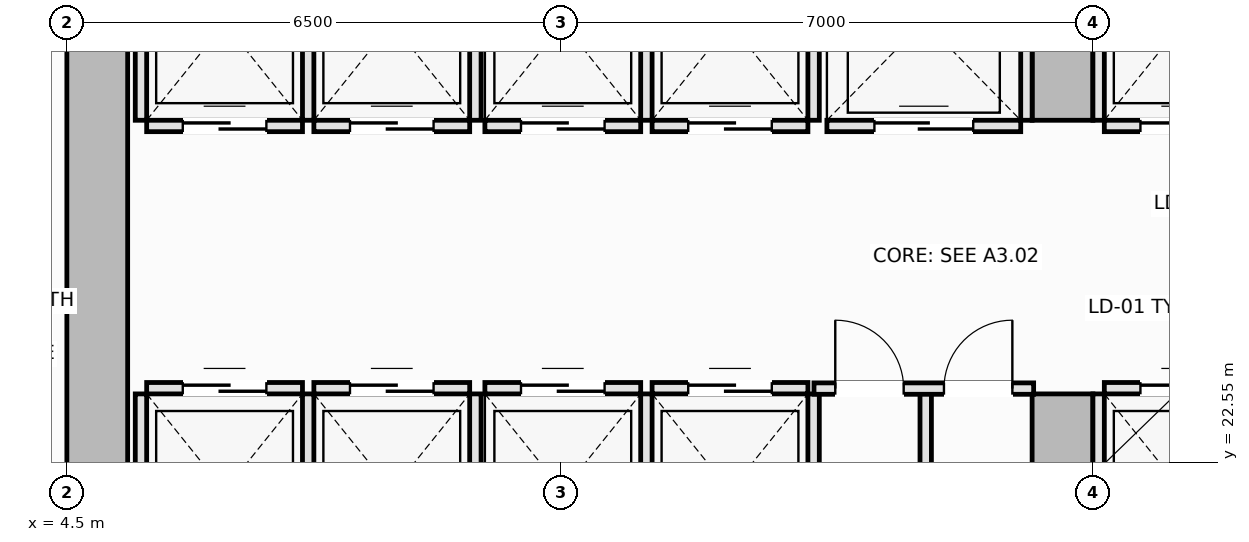
"""IFC4 building model, lengths in metres.
Left out: names, types, materials, properties, quantities, classifications, styles, units other than length and angle.
Written with IfcOpenShell. Run it as: python <this file> out.ifc"""

import sys

from ifc_helpers import new_model, si_unit, direction, frame, frame_2d, origin, place, context, subcontext, project, spatial, rectangle, extrude, element, fill, save


model = new_model("IFC4")
c1 = context("Model", 3, precision=1e-05, world=origin(), true_north=direction((0.0, 1.0)))
c2 = subcontext(c1, "Body", "Model", "MODEL_VIEW")
j1 = project(units=[si_unit("LENGTHUNIT", "METRE"), si_unit("PLANEANGLEUNIT", "RADIAN")], contexts=[c1])
p1 = place(None, origin())
s1 = spatial("IfcSite", under=j1, at=p1, CompositionType="ELEMENT")
p2 = place(p1, origin())
s2 = spatial("IfcBuilding", under=s1, at=p2, CompositionType="ELEMENT")
p3 = place(p2, origin())
s3 = spatial("IfcBuildingStorey", under=s2, at=p3, CompositionType="ELEMENT", Elevation=0.0)
p4 = place(p3, frame((4.9, 14.8, 0.0), z_axis=(0.0, 0.0, 1.0), x_axis=(0.0, 1.0, 0.0)))
e1 = element("IfcWall", 1, at=p4, inside=s3, PredefinedType="SHEAR", context=c2, shape_type="SweptSolid", body=[
    extrude(rectangle(XDim=20.9, YDim=0.8, at=frame_2d((10.45, 0.0))), origin(), (0.0, 0.0, 1.0), 6.0),
])
p5 = place(p3, frame((17.6, 14.8, 0.0), z_axis=(0.0, 0.0, 1.0), x_axis=(0.0, 1.0, 0.0)))
e2 = element("IfcWall", 2, at=p5, inside=s3, PredefinedType="SHEAR", context=c2, shape_type="SweptSolid", body=[
    extrude(rectangle(XDim=8.65, YDim=0.8, at=frame_2d((4.325, 0.0))), origin(), (0.0, 0.0, 1.0), 6.0),
])
p6 = place(p5, frame((4.1, 0.0, 0.0)))
e3 = element("IfcOpeningElement", 3, at=p6, cuts=e2, PredefinedType="OPENING", context=c2, shape_type="SweptSolid", body=[
    extrude(rectangle(XDim=1.1, YDim=2.15, at=frame_2d((0.55, 1.075))), frame((0.0, 0.41, 0.0), z_axis=(0.0, -1.0, 0.0), x_axis=(1.0, 0.0, 0.0)), (0.0, 0.0, 1.0), 0.82),
])
p7 = place(p3, frame((17.6, 27.05, 0.0), z_axis=(0.0, 0.0, 1.0), x_axis=(0.0, 1.0, 0.0)))
e4 = element("IfcWall", 4, at=p7, inside=s3, PredefinedType="SHEAR", context=c2, shape_type="SweptSolid", body=[
    extrude(rectangle(XDim=8.65, YDim=0.8, at=frame_2d((4.325, 0.0))), origin(), (0.0, 0.0, 1.0), 6.0),
])
p8 = place(p7, frame((3.45, 0.0, 0.0)))
e5 = element("IfcOpeningElement", 5, at=p8, cuts=e4, PredefinedType="OPENING", context=c2, shape_type="SweptSolid", body=[
    extrude(rectangle(XDim=1.1, YDim=2.15, at=frame_2d((0.55, 1.075))), frame((0.0, 0.41, 0.0), z_axis=(0.0, -1.0, 0.0), x_axis=(1.0, 0.0, 0.0)), (0.0, 0.0, 1.0), 0.82),
])
p9 = place(p3, frame((18.15, 23.525, 0.0), z_axis=(0.0, 0.0, 1.0), x_axis=(1.0, 0.0, 0.0)))
e6 = element("IfcWall", 6, at=p9, inside=s3, PredefinedType="PARTITIONING", context=c2, shape_type="SweptSolid", body=[
    extrude(rectangle(XDim=2.05, YDim=0.15, at=frame_2d((1.025, 0.0))), origin(), (0.0, 0.0, 1.0), 5.8),
])
p10 = place(p9, frame((0.475, 0.0, 0.0)))
e7 = element("IfcOpeningElement", 7, at=p10, cuts=e6, PredefinedType="OPENING", context=c2, shape_type="SweptSolid", body=[
    extrude(rectangle(XDim=1.1, YDim=2.2, at=frame_2d((0.55, 1.1))), frame((0.0, 0.085, 0.0), z_axis=(0.0, -1.0, 0.0), x_axis=(1.0, 0.0, 0.0)), (0.0, 0.0, 1.0), 0.17),
])
p11 = place(p3, frame((18.075, 20.9, 0.0), z_axis=(0.0, 0.0, 1.0), x_axis=(0.0, 1.0, 0.0)))
e8 = element("IfcWall", 8, at=p11, inside=s3, PredefinedType="PARTITIONING", context=c2, shape_type="SweptSolid", body=[
    extrude(rectangle(XDim=2.55, YDim=0.15, at=frame_2d((1.275, 0.0))), origin(), (0.0, 0.0, 1.0), 5.8),
])
p12 = place(p3, frame((18.15, 26.975, 0.0), z_axis=(0.0, 0.0, 1.0), x_axis=(1.0, 0.0, 0.0)))
e9 = element("IfcWall", 9, at=p12, inside=s3, PredefinedType="PARTITIONING", context=c2, shape_type="SweptSolid", body=[
    extrude(rectangle(XDim=2.05, YDim=0.15, at=frame_2d((1.025, 0.0))), origin(), (0.0, 0.0, 1.0), 5.8),
])
p13 = place(p12, frame((0.475, 0.0, 0.0)))
e10 = element("IfcOpeningElement", 10, at=p13, cuts=e9, PredefinedType="OPENING", context=c2, shape_type="SweptSolid", body=[
    extrude(rectangle(XDim=1.1, YDim=2.2, at=frame_2d((0.55, 1.1))), frame((0.0, 0.085, 0.0), z_axis=(0.0, -1.0, 0.0), x_axis=(1.0, 0.0, 0.0)), (0.0, 0.0, 1.0), 0.17),
])
p14 = place(p3, frame((18.075, 27.05, 0.0), z_axis=(0.0, 0.0, 1.0), x_axis=(0.0, 1.0, 0.0)))
e11 = element("IfcWall", 11, at=p14, inside=s3, PredefinedType="PARTITIONING", context=c2, shape_type="SweptSolid", body=[
    extrude(rectangle(XDim=2.55, YDim=0.15, at=frame_2d((1.275, 0.0))), origin(), (0.0, 0.0, 1.0), 5.8),
])
p15 = place(p3, frame((5.55, 23.525, 0.0), z_axis=(0.0, 0.0, 1.0), x_axis=(1.0, 0.0, 0.0)))
e12 = element("IfcWall", 12, at=p15, inside=s3, PredefinedType="PARTITIONING", context=c2, shape_type="SweptSolid", body=[
    extrude(rectangle(XDim=2.05, YDim=0.15, at=frame_2d((1.025, 0.0))), origin(), (0.0, 0.0, 1.0), 5.8),
])
p16 = place(p15, frame((0.475, 0.0, 0.0)))
e13 = element("IfcOpeningElement", 13, at=p16, cuts=e12, PredefinedType="OPENING", context=c2, shape_type="SweptSolid", body=[
    extrude(rectangle(XDim=1.1, YDim=2.2, at=frame_2d((0.55, 1.1))), frame((0.0, 0.085, 0.0), z_axis=(0.0, -1.0, 0.0), x_axis=(1.0, 0.0, 0.0)), (0.0, 0.0, 1.0), 0.17),
])
for number, where, z_axis, x_axis in (
    (14, (5.475, 20.9, 0.0), (0.0, 0.0, 1.0), (0.0, 1.0, 0.0)),
    (15, (7.675, 20.9, 0.0), (0.0, 0.0, 1.0), (0.0, 1.0, 0.0)),
):
    element("IfcWall", number, at=place(p3, frame(where, z_axis=z_axis, x_axis=x_axis)), inside=s3, PredefinedType="PARTITIONING", context=c2, shape_type="SweptSolid", body=[
        extrude(rectangle(XDim=2.55, YDim=0.15, at=frame_2d((1.275, 0.0))), origin(), (0.0, 0.0, 1.0), 5.8),
    ])
p17 = place(p3, frame((7.75, 23.525, 0.0), z_axis=(0.0, 0.0, 1.0), x_axis=(1.0, 0.0, 0.0)))
e16 = element("IfcWall", 16, at=p17, inside=s3, PredefinedType="PARTITIONING", context=c2, shape_type="SweptSolid", body=[
    extrude(rectangle(XDim=2.05, YDim=0.15, at=frame_2d((1.025, 0.0))), origin(), (0.0, 0.0, 1.0), 5.8),
])
p18 = place(p17, frame((0.475, 0.0, 0.0)))
e17 = element("IfcOpeningElement", 17, at=p18, cuts=e16, PredefinedType="OPENING", context=c2, shape_type="SweptSolid", body=[
    extrude(rectangle(XDim=1.1, YDim=2.2, at=frame_2d((0.55, 1.1))), frame((0.0, 0.085, 0.0), z_axis=(0.0, -1.0, 0.0), x_axis=(1.0, 0.0, 0.0)), (0.0, 0.0, 1.0), 0.17),
])
p19 = place(p3, frame((9.875, 20.9, 0.0), z_axis=(0.0, 0.0, 1.0), x_axis=(0.0, 1.0, 0.0)))
e18 = element("IfcWall", 18, at=p19, inside=s3, PredefinedType="PARTITIONING", context=c2, shape_type="SweptSolid", body=[
    extrude(rectangle(XDim=2.55, YDim=0.15, at=frame_2d((1.275, 0.0))), origin(), (0.0, 0.0, 1.0), 5.8),
])
p20 = place(p3, frame((5.55, 26.975, 0.0), z_axis=(0.0, 0.0, 1.0), x_axis=(1.0, 0.0, 0.0)))
e19 = element("IfcWall", 19, at=p20, inside=s3, PredefinedType="PARTITIONING", context=c2, shape_type="SweptSolid", body=[
    extrude(rectangle(XDim=2.05, YDim=0.15, at=frame_2d((1.025, 0.0))), origin(), (0.0, 0.0, 1.0), 5.8),
])
p21 = place(p20, frame((0.475, 0.0, 0.0)))
e20 = element("IfcOpeningElement", 20, at=p21, cuts=e19, PredefinedType="OPENING", context=c2, shape_type="SweptSolid", body=[
    extrude(rectangle(XDim=1.1, YDim=2.2, at=frame_2d((0.55, 1.1))), frame((0.0, 0.085, 0.0), z_axis=(0.0, -1.0, 0.0), x_axis=(1.0, 0.0, 0.0)), (0.0, 0.0, 1.0), 0.17),
])
for number, where, z_axis, x_axis in (
    (21, (5.475, 27.05, 0.0), (0.0, 0.0, 1.0), (0.0, 1.0, 0.0)),
    (22, (7.675, 27.05, 0.0), (0.0, 0.0, 1.0), (0.0, 1.0, 0.0)),
):
    element("IfcWall", number, at=place(p3, frame(where, z_axis=z_axis, x_axis=x_axis)), inside=s3, PredefinedType="PARTITIONING", context=c2, shape_type="SweptSolid", body=[
        extrude(rectangle(XDim=2.55, YDim=0.15, at=frame_2d((1.275, 0.0))), origin(), (0.0, 0.0, 1.0), 5.8),
    ])
p22 = place(p3, frame((7.75, 26.975, 0.0), z_axis=(0.0, 0.0, 1.0), x_axis=(1.0, 0.0, 0.0)))
e23 = element("IfcWall", 23, at=p22, inside=s3, PredefinedType="PARTITIONING", context=c2, shape_type="SweptSolid", body=[
    extrude(rectangle(XDim=2.05, YDim=0.15, at=frame_2d((1.025, 0.0))), origin(), (0.0, 0.0, 1.0), 5.8),
])
p23 = place(p22, frame((0.475, 0.0, 0.0)))
e24 = element("IfcOpeningElement", 24, at=p23, cuts=e23, PredefinedType="OPENING", context=c2, shape_type="SweptSolid", body=[
    extrude(rectangle(XDim=1.1, YDim=2.2, at=frame_2d((0.55, 1.1))), frame((0.0, 0.085, 0.0), z_axis=(0.0, -1.0, 0.0), x_axis=(1.0, 0.0, 0.0)), (0.0, 0.0, 1.0), 0.17),
])
p24 = place(p3, frame((9.875, 27.05, 0.0), z_axis=(0.0, 0.0, 1.0), x_axis=(0.0, 1.0, 0.0)))
e25 = element("IfcWall", 25, at=p24, inside=s3, PredefinedType="PARTITIONING", context=c2, shape_type="SweptSolid", body=[
    extrude(rectangle(XDim=2.55, YDim=0.15, at=frame_2d((1.275, 0.0))), origin(), (0.0, 0.0, 1.0), 5.8),
])
p25 = place(p3, frame((10.0, 23.525, 0.0), z_axis=(0.0, 0.0, 1.0), x_axis=(1.0, 0.0, 0.0)))
e26 = element("IfcWall", 26, at=p25, inside=s3, PredefinedType="PARTITIONING", context=c2, shape_type="SweptSolid", body=[
    extrude(rectangle(XDim=2.05, YDim=0.15, at=frame_2d((1.025, 0.0))), origin(), (0.0, 0.0, 1.0), 5.8),
])
p26 = place(p25, frame((0.475, 0.0, 0.0)))
e27 = element("IfcOpeningElement", 27, at=p26, cuts=e26, PredefinedType="OPENING", context=c2, shape_type="SweptSolid", body=[
    extrude(rectangle(XDim=1.1, YDim=2.2, at=frame_2d((0.55, 1.1))), frame((0.0, 0.085, 0.0), z_axis=(0.0, -1.0, 0.0), x_axis=(1.0, 0.0, 0.0)), (0.0, 0.0, 1.0), 0.17),
])
p27 = place(p3, frame((12.125, 20.9, 0.0), z_axis=(0.0, 0.0, 1.0), x_axis=(0.0, 1.0, 0.0)))
e28 = element("IfcWall", 28, at=p27, inside=s3, PredefinedType="PARTITIONING", context=c2, shape_type="SweptSolid", body=[
    extrude(rectangle(XDim=2.55, YDim=0.15, at=frame_2d((1.275, 0.0))), origin(), (0.0, 0.0, 1.0), 5.8),
])
p28 = place(p3, frame((12.2, 23.525, 0.0), z_axis=(0.0, 0.0, 1.0), x_axis=(1.0, 0.0, 0.0)))
e29 = element("IfcWall", 29, at=p28, inside=s3, PredefinedType="PARTITIONING", context=c2, shape_type="SweptSolid", body=[
    extrude(rectangle(XDim=2.05, YDim=0.15, at=frame_2d((1.025, 0.0))), origin(), (0.0, 0.0, 1.0), 5.8),
])
p29 = place(p28, frame((0.475, 0.0, 0.0)))
e30 = element("IfcOpeningElement", 30, at=p29, cuts=e29, PredefinedType="OPENING", context=c2, shape_type="SweptSolid", body=[
    extrude(rectangle(XDim=1.1, YDim=2.2, at=frame_2d((0.55, 1.1))), frame((0.0, 0.085, 0.0), z_axis=(0.0, -1.0, 0.0), x_axis=(1.0, 0.0, 0.0)), (0.0, 0.0, 1.0), 0.17),
])
p30 = place(p3, frame((14.325, 20.9, 0.0), z_axis=(0.0, 0.0, 1.0), x_axis=(0.0, 1.0, 0.0)))
e31 = element("IfcWall", 31, at=p30, inside=s3, PredefinedType="PARTITIONING", context=c2, shape_type="SweptSolid", body=[
    extrude(rectangle(XDim=2.55, YDim=0.15, at=frame_2d((1.275, 0.0))), origin(), (0.0, 0.0, 1.0), 5.8),
])
p31 = place(p3, frame((10.0, 26.975, 0.0), z_axis=(0.0, 0.0, 1.0), x_axis=(1.0, 0.0, 0.0)))
e32 = element("IfcWall", 32, at=p31, inside=s3, PredefinedType="PARTITIONING", context=c2, shape_type="SweptSolid", body=[
    extrude(rectangle(XDim=2.05, YDim=0.15, at=frame_2d((1.025, 0.0))), origin(), (0.0, 0.0, 1.0), 5.8),
])
p32 = place(p31, frame((0.475, 0.0, 0.0)))
e33 = element("IfcOpeningElement", 33, at=p32, cuts=e32, PredefinedType="OPENING", context=c2, shape_type="SweptSolid", body=[
    extrude(rectangle(XDim=1.1, YDim=2.2, at=frame_2d((0.55, 1.1))), frame((0.0, 0.085, 0.0), z_axis=(0.0, -1.0, 0.0), x_axis=(1.0, 0.0, 0.0)), (0.0, 0.0, 1.0), 0.17),
])
p33 = place(p3, frame((12.125, 27.05, 0.0), z_axis=(0.0, 0.0, 1.0), x_axis=(0.0, 1.0, 0.0)))
e34 = element("IfcWall", 34, at=p33, inside=s3, PredefinedType="PARTITIONING", context=c2, shape_type="SweptSolid", body=[
    extrude(rectangle(XDim=2.55, YDim=0.15, at=frame_2d((1.275, 0.0))), origin(), (0.0, 0.0, 1.0), 5.8),
])
p34 = place(p3, frame((12.2, 26.975, 0.0), z_axis=(0.0, 0.0, 1.0), x_axis=(1.0, 0.0, 0.0)))
e35 = element("IfcWall", 35, at=p34, inside=s3, PredefinedType="PARTITIONING", context=c2, shape_type="SweptSolid", body=[
    extrude(rectangle(XDim=2.05, YDim=0.15, at=frame_2d((1.025, 0.0))), origin(), (0.0, 0.0, 1.0), 5.8),
])
p35 = place(p34, frame((0.475, 0.0, 0.0)))
e36 = element("IfcOpeningElement", 36, at=p35, cuts=e35, PredefinedType="OPENING", context=c2, shape_type="SweptSolid", body=[
    extrude(rectangle(XDim=1.1, YDim=2.2, at=frame_2d((0.55, 1.1))), frame((0.0, 0.085, 0.0), z_axis=(0.0, -1.0, 0.0), x_axis=(1.0, 0.0, 0.0)), (0.0, 0.0, 1.0), 0.17),
])
p36 = place(p3, frame((14.325, 27.05, 0.0), z_axis=(0.0, 0.0, 1.0), x_axis=(0.0, 1.0, 0.0)))
e37 = element("IfcWall", 37, at=p36, inside=s3, PredefinedType="PARTITIONING", context=c2, shape_type="SweptSolid", body=[
    extrude(rectangle(XDim=2.55, YDim=0.15, at=frame_2d((1.275, 0.0))), origin(), (0.0, 0.0, 1.0), 5.8),
])
p37 = place(p3, frame((14.5, 26.975, 0.0), z_axis=(0.0, 0.0, 1.0), x_axis=(1.0, 0.0, 0.0)))
e38 = element("IfcWall", 38, at=p37, inside=s3, PredefinedType="PARTITIONING", context=c2, shape_type="SweptSolid", body=[
    extrude(rectangle(XDim=2.55, YDim=0.15, at=frame_2d((1.275, 0.0))), origin(), (0.0, 0.0, 1.0), 5.8),
])
p38 = place(p37, frame((0.625, 0.0, 0.0)))
e39 = element("IfcOpeningElement", 39, at=p38, cuts=e38, PredefinedType="OPENING", context=c2, shape_type="SweptSolid", body=[
    extrude(rectangle(XDim=1.3, YDim=2.2, at=frame_2d((0.65, 1.1))), frame((0.0, 0.085, 0.0), z_axis=(0.0, -1.0, 0.0), x_axis=(1.0, 0.0, 0.0)), (0.0, 0.0, 1.0), 0.17),
])
p39 = place(p3, frame((17.125, 27.05, 0.0), z_axis=(0.0, 0.0, 1.0), x_axis=(0.0, 1.0, 0.0)))
e40 = element("IfcWall", 40, at=p39, inside=s3, PredefinedType="PARTITIONING", context=c2, shape_type="SweptSolid", body=[
    extrude(rectangle(XDim=2.6, YDim=0.15, at=frame_2d((1.3, 0.0))), origin(), (0.0, 0.0, 1.0), 5.8),
])
p40 = place(p3, frame((15.8, 20.85, 0.0), z_axis=(0.0, 0.0, 1.0), x_axis=(0.0, 1.0, 0.0)))
e41 = element("IfcWall", 41, at=p40, inside=s3, PredefinedType="PARTITIONING", context=c2, shape_type="SweptSolid", body=[
    extrude(rectangle(XDim=2.67, YDim=0.15, at=frame_2d((1.335, 0.0))), origin(), (0.0, 0.0, 1.0), 5.8),
])
p41 = place(p3, frame((14.33, 23.52, 0.0), z_axis=(0.0, 0.0, 1.0), x_axis=(1.0, 0.0, 0.0)))
e42 = element("IfcWall", 42, at=p41, inside=s3, PredefinedType="PARTITIONING", context=c2, shape_type="SweptSolid", body=[
    extrude(rectangle(XDim=2.89, YDim=0.15, at=frame_2d((1.445, 0.0))), origin(), (0.0, 0.0, 1.0), 5.8),
])
p42 = place(p41, frame((0.28, 0.0, 0.0)))
e43 = element("IfcOpeningElement", 43, at=p42, cuts=e42, PredefinedType="OPENING", context=c2, shape_type="SweptSolid", body=[
    extrude(rectangle(XDim=0.9, YDim=2.1, at=frame_2d((0.45, 1.05))), frame((0.0, 0.085, 0.0), z_axis=(0.0, -1.0, 0.0), x_axis=(1.0, 0.0, 0.0)), (0.0, 0.0, 1.0), 0.17),
])
p43 = place(p41, frame((1.71, 0.0, 0.0)))
e44 = element("IfcOpeningElement", 44, at=p43, cuts=e42, PredefinedType="OPENING", context=c2, shape_type="SweptSolid", body=[
    extrude(rectangle(XDim=0.9, YDim=2.1, at=frame_2d((0.45, 1.05))), frame((0.0, 0.085, 0.0), z_axis=(0.0, -1.0, 0.0), x_axis=(1.0, 0.0, 0.0)), (0.0, 0.0, 1.0), 0.17),
])
p44 = place(p10, origin())
e45 = element("IfcDoor", 45, at=p44, inside=s3, OperationType="DOUBLE_DOOR_SLIDING", PredefinedType="DOOR", context=c2, shape_type="SweptSolid", body=[
    extrude(rectangle(XDim=1.1, YDim=2.2, at=frame_2d((0.55, 1.1))), frame((0.0, 0.025, 0.0), z_axis=(0.0, -1.0, 0.0), x_axis=(1.0, 0.0, 0.0)), (0.0, 0.0, 1.0), 0.05),
])
fill(e7, e45)
p45 = place(p13, origin())
e46 = element("IfcDoor", 46, at=p45, inside=s3, OperationType="DOUBLE_DOOR_SLIDING", PredefinedType="DOOR", context=c2, shape_type="SweptSolid", body=[
    extrude(rectangle(XDim=1.1, YDim=2.2, at=frame_2d((0.55, 1.1))), frame((0.0, 0.025, 0.0), z_axis=(0.0, -1.0, 0.0), x_axis=(1.0, 0.0, 0.0)), (0.0, 0.0, 1.0), 0.05),
])
fill(e10, e46)
p46 = place(p16, origin())
e47 = element("IfcDoor", 47, at=p46, inside=s3, OperationType="DOUBLE_DOOR_SLIDING", PredefinedType="DOOR", context=c2, shape_type="SweptSolid", body=[
    extrude(rectangle(XDim=1.1, YDim=2.2, at=frame_2d((0.55, 1.1))), frame((0.0, 0.025, 0.0), z_axis=(0.0, -1.0, 0.0), x_axis=(1.0, 0.0, 0.0)), (0.0, 0.0, 1.0), 0.05),
])
fill(e13, e47)
p47 = place(p18, origin())
e48 = element("IfcDoor", 48, at=p47, inside=s3, OperationType="DOUBLE_DOOR_SLIDING", PredefinedType="DOOR", context=c2, shape_type="SweptSolid", body=[
    extrude(rectangle(XDim=1.1, YDim=2.2, at=frame_2d((0.55, 1.1))), frame((0.0, 0.025, 0.0), z_axis=(0.0, -1.0, 0.0), x_axis=(1.0, 0.0, 0.0)), (0.0, 0.0, 1.0), 0.05),
])
fill(e17, e48)
p48 = place(p21, origin())
e49 = element("IfcDoor", 49, at=p48, inside=s3, OperationType="DOUBLE_DOOR_SLIDING", PredefinedType="DOOR", context=c2, shape_type="SweptSolid", body=[
    extrude(rectangle(XDim=1.1, YDim=2.2, at=frame_2d((0.55, 1.1))), frame((0.0, 0.025, 0.0), z_axis=(0.0, -1.0, 0.0), x_axis=(1.0, 0.0, 0.0)), (0.0, 0.0, 1.0), 0.05),
])
fill(e20, e49)
p49 = place(p23, origin())
e50 = element("IfcDoor", 50, at=p49, inside=s3, OperationType="DOUBLE_DOOR_SLIDING", PredefinedType="DOOR", context=c2, shape_type="SweptSolid", body=[
    extrude(rectangle(XDim=1.1, YDim=2.2, at=frame_2d((0.55, 1.1))), frame((0.0, 0.025, 0.0), z_axis=(0.0, -1.0, 0.0), x_axis=(1.0, 0.0, 0.0)), (0.0, 0.0, 1.0), 0.05),
])
fill(e24, e50)
p50 = place(p26, origin())
e51 = element("IfcDoor", 51, at=p50, inside=s3, OperationType="DOUBLE_DOOR_SLIDING", PredefinedType="DOOR", context=c2, shape_type="SweptSolid", body=[
    extrude(rectangle(XDim=1.1, YDim=2.2, at=frame_2d((0.55, 1.1))), frame((0.0, 0.025, 0.0), z_axis=(0.0, -1.0, 0.0), x_axis=(1.0, 0.0, 0.0)), (0.0, 0.0, 1.0), 0.05),
])
fill(e27, e51)
p51 = place(p29, origin())
e52 = element("IfcDoor", 52, at=p51, inside=s3, OperationType="DOUBLE_DOOR_SLIDING", PredefinedType="DOOR", context=c2, shape_type="SweptSolid", body=[
    extrude(rectangle(XDim=1.1, YDim=2.2, at=frame_2d((0.55, 1.1))), frame((0.0, 0.025, 0.0), z_axis=(0.0, -1.0, 0.0), x_axis=(1.0, 0.0, 0.0)), (0.0, 0.0, 1.0), 0.05),
])
fill(e30, e52)
p52 = place(p32, origin())
e53 = element("IfcDoor", 53, at=p52, inside=s3, OperationType="DOUBLE_DOOR_SLIDING", PredefinedType="DOOR", context=c2, shape_type="SweptSolid", body=[
    extrude(rectangle(XDim=1.1, YDim=2.2, at=frame_2d((0.55, 1.1))), frame((0.0, 0.025, 0.0), z_axis=(0.0, -1.0, 0.0), x_axis=(1.0, 0.0, 0.0)), (0.0, 0.0, 1.0), 0.05),
])
fill(e33, e53)
p53 = place(p35, origin())
e54 = element("IfcDoor", 54, at=p53, inside=s3, OperationType="DOUBLE_DOOR_SLIDING", PredefinedType="DOOR", context=c2, shape_type="SweptSolid", body=[
    extrude(rectangle(XDim=1.1, YDim=2.2, at=frame_2d((0.55, 1.1))), frame((0.0, 0.025, 0.0), z_axis=(0.0, -1.0, 0.0), x_axis=(1.0, 0.0, 0.0)), (0.0, 0.0, 1.0), 0.05),
])
fill(e36, e54)
p54 = place(p38, origin())
e55 = element("IfcDoor", 55, at=p54, inside=s3, OperationType="DOUBLE_DOOR_SLIDING", PredefinedType="DOOR", context=c2, shape_type="SweptSolid", body=[
    extrude(rectangle(XDim=1.3, YDim=2.2, at=frame_2d((0.65, 1.1))), frame((0.0, 0.025, 0.0), z_axis=(0.0, -1.0, 0.0), x_axis=(1.0, 0.0, 0.0)), (0.0, 0.0, 1.0), 0.05),
])
fill(e39, e55)
p55 = place(p42, origin())
e56 = element("IfcDoor", 56, at=p55, inside=s3, OperationType="SINGLE_SWING_LEFT", PredefinedType="DOOR", context=c2, shape_type="SweptSolid", body=[
    extrude(rectangle(XDim=0.9, YDim=2.1, at=frame_2d((0.45, 1.05))), frame((0.0, 0.025, 0.0), z_axis=(0.0, -1.0, 0.0), x_axis=(1.0, 0.0, 0.0)), (0.0, 0.0, 1.0), 0.05),
])
fill(e43, e56)
p56 = place(p43, origin())
e57 = element("IfcDoor", 57, at=p56, inside=s3, OperationType="SINGLE_SWING_RIGHT", PredefinedType="DOOR", context=c2, shape_type="SweptSolid", body=[
    extrude(rectangle(XDim=0.9, YDim=2.1, at=frame_2d((0.45, 1.05))), frame((0.0, 0.025, 0.0), z_axis=(0.0, -1.0, 0.0), x_axis=(1.0, 0.0, 0.0)), (0.0, 0.0, 1.0), 0.05),
])
fill(e44, e57)
save(model, sys.argv[1])
